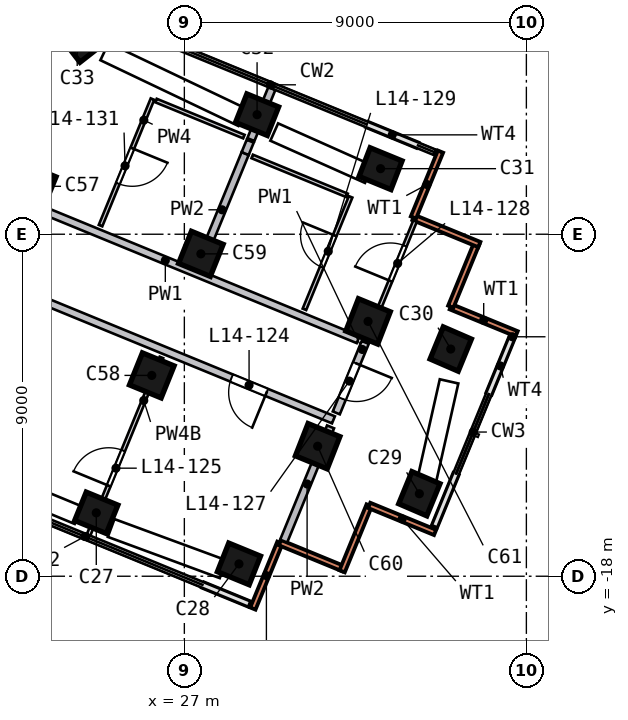
"""IFC4 building model, lengths in metres.
Left out: names, types, materials, properties, quantities, classifications, styles, units other than length and angle.
Written with IfcOpenShell. Run it as: python <this file> out.ifc"""

import sys

from ifc_helpers import new_model, si_unit, direction, frame, frame_2d, origin, origin_2d, place, context, subcontext, project, spatial, rectangle, extrude, element, fill, save


model = new_model("IFC4")
c1 = context("Model", 3, precision=1e-05, world=origin(), true_north=direction((0.0, 1.0)))
c2 = subcontext(c1, "Body", "Model", "MODEL_VIEW")
j1 = project(units=[si_unit("LENGTHUNIT", "METRE"), si_unit("PLANEANGLEUNIT", "RADIAN")], contexts=[c1])
p1 = place(None, origin())
s1 = spatial("IfcSite", under=j1, at=p1, CompositionType="ELEMENT")
p2 = place(p1, origin())
s2 = spatial("IfcBuilding", under=s1, at=p2, CompositionType="ELEMENT")
p3 = place(p2, frame((0.0, 0.0, 64.5)))
s3 = spatial("IfcBuildingStorey", under=s2, at=p3, CompositionType="ELEMENT", Elevation=64.5)
p4 = place(p3, frame((24.65, -16.498, 0.0), z_axis=(0.026751278, 0.137242391, 0.990176194), x_axis=(0.926161239, -0.376151794, 0.027114341)))
e1 = element("IfcColumn", 1, at=p4, inside=s3, PredefinedType="COLUMN", context=c2, shape_type="SweptSolid", body=[
    extrude(rectangle(XDim=0.9, YDim=0.8, at=origin_2d()), origin(), (0.0, 0.0, 1.0), 3.222),
])
p5 = place(p3, frame((28.458, -17.888, 0.0), z_axis=(-0.017180855, 0.174069185, 0.984583535), x_axis=(0.926794168, -0.366729109, 0.081008213)))
e2 = element("IfcColumn", 2, at=p5, inside=s3, PredefinedType="COLUMN", context=c2, shape_type="SweptSolid", body=[
    extrude(rectangle(XDim=0.9, YDim=0.8, at=origin_2d()), origin(), (0.0, 0.0, 1.0), 3.24),
])
p6 = place(p3, frame((33.215, -16.068, 0.0), z_axis=(-0.025810356, 0.195603485, 0.980343359), x_axis=(0.390060044, 0.904907178, -0.170282593)))
e3 = element("IfcColumn", 3, at=p6, inside=s3, PredefinedType="COLUMN", context=c2, shape_type="SweptSolid", body=[
    extrude(rectangle(XDim=0.9, YDim=0.8, at=origin_2d()), origin(), (0.0, 0.0, 1.0), 3.254),
])
p7 = place(p3, frame((34.063, -12.265, 0.0), z_axis=(-0.043682988, 0.199083534, 0.979008449), x_axis=(0.39246108, 0.90458431, -0.166437755)))
e4 = element("IfcColumn", 4, at=p7, inside=s3, PredefinedType="COLUMN", context=c2, shape_type="SweptSolid", body=[
    extrude(rectangle(XDim=0.9, YDim=0.8, at=origin_2d()), origin(), (0.0, 0.0, 1.0), 3.258),
])
p8 = place(p3, frame((32.244, -7.508, 0.0), z_axis=(-0.065892209, 0.190555172, 0.979462579), x_axis=(-0.924497872, 0.357683073, -0.13178203)))
e5 = element("IfcColumn", 5, at=p8, inside=s3, PredefinedType="COLUMN", context=c2, shape_type="SweptSolid", body=[
    extrude(rectangle(XDim=0.9, YDim=0.8, at=origin_2d()), origin(), (0.0, 0.0, 1.0), 3.257),
])
p9 = place(p3, frame((28.942, -6.044, 0.0), z_axis=(-0.022897485, 0.15665507, 0.987387915), x_axis=(-0.926259522, 0.368316181, -0.079915512)))
e6 = element("IfcColumn", 6, at=p9, inside=s3, PredefinedType="COLUMN", context=c2, shape_type="SweptSolid", body=[
    extrude(rectangle(XDim=0.9, YDim=0.8, at=origin_2d()), origin(), (0.0, 0.0, 1.0), 3.231),
])
p10 = place(p3, frame((24.16, -3.779, 0.0), z_axis=(0.017027467, 0.115011417, 0.993218223), x_axis=(0.614451168, -0.784852686, 0.080349384)))
e7 = element("IfcColumn", 7, at=p10, inside=s3, PredefinedType="COLUMN", context=c2, shape_type="SweptSolid", body=[
    extrude(rectangle(XDim=1.4, YDim=0.9, at=origin_2d()), origin(), (0.0, 0.0, 1.0), 3.212),
])
p11 = place(p3, frame((22.991, -7.871, 0.0), z_axis=(0.036566468, 0.109623383, 0.993300361), x_axis=(0.925210726, -0.379373345, 0.007808817)))
e8 = element("IfcColumn", 8, at=p11, inside=s3, PredefinedType="COLUMN", context=c2, shape_type="SweptSolid", body=[
    extrude(rectangle(XDim=0.9, YDim=0.9, at=origin_2d()), origin(), (0.0, 0.0, 1.0), 3.211),
])
p12 = place(p3, frame((26.132, -12.889, 0.0), z_axis=(0.009542442, 0.1439697, 0.989536087), x_axis=(0.926587506, -0.373331125, 0.045381329)))
e9 = element("IfcColumn", 9, at=p12, inside=s3, PredefinedType="COLUMN", context=c2, shape_type="SweptSolid", body=[
    extrude(rectangle(XDim=0.9, YDim=0.9, at=origin_2d()), origin(), (0.0, 0.0, 1.0), 3.224),
])
p13 = place(p3, frame((27.442, -9.698, 0.0), z_axis=(-0.00559941, 0.149973383, 0.988674178), x_axis=(0.926568653, -0.371058081, 0.061533996)))
e10 = element("IfcColumn", 10, at=p13, inside=s3, PredefinedType="COLUMN", context=c2, shape_type="SweptSolid", body=[
    extrude(rectangle(XDim=0.9, YDim=0.9, at=origin_2d()), origin(), (0.0, 0.0, 1.0), 3.227),
])
p14 = place(p3, frame((30.546, -14.802, 0.0), z_axis=(-0.031733166, 0.183405668, 0.982524996), x_axis=(0.926483061, -0.36341692, 0.097761344)))
e11 = element("IfcColumn", 11, at=p14, inside=s3, PredefinedType="COLUMN", context=c2, shape_type="SweptSolid", body=[
    extrude(rectangle(XDim=0.9, YDim=0.9, at=origin_2d()), origin(), (0.0, 0.0, 1.0), 3.247),
])
p15 = place(p3, frame((31.892, -11.525, 0.0), z_axis=(-0.04714013, 0.18931116, 0.980784937), x_axis=(0.925849426, -0.360274524, 0.114039935)))
e12 = element("IfcColumn", 12, at=p15, inside=s3, PredefinedType="COLUMN", context=c2, shape_type="SweptSolid", body=[
    extrude(rectangle(XDim=0.9, YDim=0.9, at=origin_2d()), origin(), (0.0, 0.0, 1.0), 3.252),
])
p16 = place(p3, frame((28.803, -18.851, 0.0), z_axis=(0.0, 0.0, 1.0), x_axis=(0.379839266, 0.925052502, 0.0)))
e13 = element("IfcWall", 13, at=p16, inside=s3, PredefinedType="SOLIDWALL", context=c2, shape_type="SweptSolid", body=[
    extrude(rectangle(XDim=1.875, YDim=0.15, at=frame_2d((0.938, 0.0))), origin(), (0.0, 0.0, 1.0), 3.19),
])
p17 = place(p3, frame((29.515, -17.117, 0.0), z_axis=(0.0, 0.0, 1.0), x_axis=(0.925070884, -0.379794498, 0.0)))
e14 = element("IfcWall", 14, at=p17, inside=s3, PredefinedType="SOLIDWALL", context=c2, shape_type="SweptSolid", body=[
    extrude(rectangle(XDim=1.8, YDim=0.15, at=frame_2d((0.9, 0.0))), origin(), (0.0, 0.0, 1.0), 3.19),
])
for number, where, z_axis, x_axis in (
    (15, (31.152, -17.87, 0.0), (0.0, 0.0, 1.0), (0.38, 0.925, 0.0)),
    (16, (31.864, -16.135, 0.0), (0.0, 0.0, 1.0), (0.925, -0.38, 0.0)),
    (17, (35.744, -11.621, 0.0), (0.0, 0.0, 1.0), (-0.925, 0.38, 0.0)),
):
    element("IfcWall", number, at=place(p3, frame(where, z_axis=z_axis, x_axis=x_axis)), inside=s3, PredefinedType="SOLIDWALL", context=c2, shape_type="SweptSolid", body=[
        extrude(rectangle(XDim=1.875, YDim=0.15, at=frame_2d((0.938, 0.0))), origin(), (0.0, 0.0, 1.0), 3.19),
    ])
p18 = place(p3, frame((34.01, -10.908, 0.0), z_axis=(0.0, 0.0, 1.0), x_axis=(0.379746847, 0.925090445, 0.0)))
e18 = element("IfcWall", 18, at=p18, inside=s3, PredefinedType="SOLIDWALL", context=c2, shape_type="SweptSolid", body=[
    extrude(rectangle(XDim=1.8, YDim=0.15, at=frame_2d((0.9, 0.0))), origin(), (0.0, 0.0, 1.0), 3.19),
])
for number, where, z_axis, x_axis in (
    (19, (34.763, -9.272, 0.0), (0.0, 0.0, 1.0), (-0.925, 0.38, 0.0)),
    (20, (33.028, -8.56, 0.0), (0.0, 0.0, 1.0), (0.38, 0.925, 0.0)),
):
    element("IfcWall", number, at=place(p3, frame(where, z_axis=z_axis, x_axis=x_axis)), inside=s3, PredefinedType="SOLIDWALL", context=c2, shape_type="SweptSolid", body=[
        extrude(rectangle(XDim=1.875, YDim=0.15, at=frame_2d((0.938, 0.0))), origin(), (0.0, 0.0, 1.0), 3.19),
    ])
p19 = place(p3, frame((27.49, -18.231, 0.0), z_axis=(0.0, 0.0, 1.0), x_axis=(0.925072618, -0.379790274, 0.0)))
e21 = element("IfcWall", 21, at=p19, inside=s3, PredefinedType="SOLIDWALL", context=c2, shape_type="SweptSolid", body=[
    extrude(rectangle(XDim=1.306, YDim=0.15, at=frame_2d((0.653, 0.0))), origin(), (0.0, 0.0, 1.0), 2.425),
])
p20 = place(p3, frame((33.588, -16.675, 0.0), z_axis=(0.0, 0.0, 1.0), x_axis=(0.379726874, 0.925098644, 0.0)))
e22 = element("IfcWall", 22, at=p20, inside=s3, PredefinedType="SOLIDWALL", context=c2, shape_type="SweptSolid", body=[
    extrude(rectangle(XDim=1.477, YDim=0.15, at=frame_2d((0.738, 0.0))), origin(), (0.0, 0.0, 1.0), 2.425),
])
p21 = place(p3, frame((35.016, -13.197, 0.0), z_axis=(0.0, 0.0, 1.0), x_axis=(0.379793722, 0.925071202, 0.0)))
e23 = element("IfcWall", 23, at=p21, inside=s3, PredefinedType="SOLIDWALL", context=c2, shape_type="SweptSolid", body=[
    extrude(rectangle(XDim=1.58, YDim=0.15, at=frame_2d((0.79, 0.0))), origin(), (0.0, 0.0, 1.0), 2.425),
])
p22 = place(p3, frame((33.134, -6.657, 0.0), z_axis=(0.0, 0.0, 1.0), x_axis=(-0.925093505, 0.379739394, 0.0)))
e24 = element("IfcWall", 24, at=p22, inside=s3, PredefinedType="SOLIDWALL", context=c2, shape_type="SweptSolid", body=[
    extrude(rectangle(XDim=1.434, YDim=0.15, at=frame_2d((0.717, 0.0))), origin(), (0.0, 0.0, 1.0), 2.425),
])
p23 = place(p3, frame((30.923, -13.884, 0.0), z_axis=(0.0, 0.0, 1.0), x_axis=(-0.92507774, 0.379777796, 0.0)))
e25 = element("IfcWall", 25, at=p23, inside=s3, PredefinedType="SOLIDWALL", context=c2, shape_type="SweptSolid", body=[
    extrude(rectangle(XDim=15.921, YDim=0.2, at=frame_2d((7.96, 0.0))), origin(), (0.0, 0.0, 1.0), 3.19),
])
p24 = place(p23, frame((1.9, 0.0, 0.0)))
e26 = element("IfcOpeningElement", 26, at=p24, cuts=e25, PredefinedType="OPENING", context=c2, shape_type="SweptSolid", body=[
    extrude(rectangle(XDim=1.0, YDim=2.1, at=frame_2d((0.5, 1.05))), frame((0.0, 0.11, 0.0), z_axis=(0.0, -1.0, 0.0), x_axis=(1.0, 0.0, 0.0)), (0.0, 0.0, 1.0), 0.22),
])
p25 = place(p3, frame((16.846, -5.727, 0.0), z_axis=(0.0, 0.0, 1.0), x_axis=(0.92507774, -0.379777796, 0.0)))
e27 = element("IfcWall", 27, at=p25, inside=s3, PredefinedType="SOLIDWALL", context=c2, shape_type="SweptSolid", body=[
    extrude(rectangle(XDim=15.921, YDim=0.2, at=frame_2d((7.96, 0.0))), origin(), (0.0, 0.0, 1.0), 3.19),
])
p26 = place(p25, frame((3.75, 0.0, 0.0)))
e28 = element("IfcOpeningElement", 28, at=p26, cuts=e27, PredefinedType="OPENING", context=c2, shape_type="SweptSolid", body=[
    extrude(rectangle(XDim=1.0, YDim=2.1, at=frame_2d((0.5, 1.05))), frame((0.0, 0.11, 0.0), z_axis=(0.0, -1.0, 0.0), x_axis=(1.0, 0.0, 0.0)), (0.0, 0.0, 1.0), 0.22),
])
p27 = place(p3, frame((31.76, -11.847, 0.0), z_axis=(0.0, 0.0, 1.0), x_axis=(-0.379818342, -0.925061094, 0.0)))
e29 = element("IfcWall", 29, at=p27, inside=s3, PredefinedType="SOLIDWALL", context=c2, shape_type="SweptSolid", body=[
    extrude(rectangle(XDim=2.004, YDim=0.2, at=frame_2d((1.002, 0.0))), origin(), (0.0, 0.0, 1.0), 3.19),
])
p28 = place(p27, frame((0.6, 0.0, 0.0)))
e30 = element("IfcOpeningElement", 30, at=p28, cuts=e29, PredefinedType="OPENING", context=c2, shape_type="SweptSolid", body=[
    extrude(rectangle(XDim=1.0, YDim=2.1, at=frame_2d((0.5, 1.05))), frame((0.0, 0.11, 0.0), z_axis=(0.0, -1.0, 0.0), x_axis=(1.0, 0.0, 0.0)), (0.0, 0.0, 1.0), 0.22),
])
p29 = place(p3, frame((27.385, -9.837, 0.0), z_axis=(0.0, 0.0, 1.0), x_axis=(0.379794115, 0.925071041, 0.0)))
e31 = element("IfcWall", 31, at=p29, inside=s3, PredefinedType="SOLIDWALL", context=c2, shape_type="SweptSolid", body=[
    extrude(rectangle(XDim=3.2, YDim=0.2, at=frame_2d((1.6, 0.0))), origin(), (0.0, 0.0, 1.0), 3.19),
])
p30 = place(p3, frame((28.6, -6.877, 0.0), z_axis=(0.0, 0.0, 1.0), x_axis=(0.379982422, 0.924993707, 0.0)))
e32 = element("IfcWall", 32, at=p30, inside=s3, PredefinedType="SOLIDWALL", context=c2, shape_type="SweptSolid", body=[
    extrude(rectangle(XDim=0.352, YDim=0.2, at=frame_2d((0.176, 0.0))), origin(), (0.0, 0.0, 1.0), 3.19),
])
p31 = place(p3, frame((28.751, -6.509, 0.0), z_axis=(0.0, 0.0, 1.0), x_axis=(0.379667061, 0.925123193, 0.0)))
e33 = element("IfcWall", 33, at=p31, inside=s3, PredefinedType="SOLIDWALL", context=c2, shape_type="SweptSolid", body=[
    extrude(rectangle(XDim=1.452, YDim=0.2, at=frame_2d((0.726, 0.0))), origin(), (0.0, 0.0, 1.0), 3.19),
])
p32 = place(p3, frame((30.847, -14.069, 0.0), z_axis=(0.0, 0.0, 1.0), x_axis=(-0.379729459, -0.925097583, 0.0)))
e34 = element("IfcWall", 34, at=p32, inside=s3, PredefinedType="SOLIDWALL", context=c2, shape_type="SweptSolid", body=[
    extrude(rectangle(XDim=3.25, YDim=0.2, at=frame_2d((1.625, 0.0))), origin(), (0.0, 0.0, 1.0), 3.19),
])
p33 = place(p3, frame((24.479, -16.914, 0.0), z_axis=(0.0, 0.0, 1.0), x_axis=(0.379777028, 0.925078056, 0.0)))
e35 = element("IfcWall", 35, at=p33, inside=s3, PredefinedType="PARTITIONING", context=c2, shape_type="SweptSolid", body=[
    extrude(rectangle(XDim=5.05, YDim=0.1, at=frame_2d((2.525, 0.0))), origin(), (0.0, 0.0, 1.0), 2.69),
])
p34 = place(p33, frame((1.4, 0.0, 0.0)))
e36 = element("IfcOpeningElement", 36, at=p34, cuts=e35, PredefinedType="OPENING", context=c2, shape_type="SweptSolid", body=[
    extrude(rectangle(XDim=1.0, YDim=2.1, at=frame_2d((0.5, 1.05))), frame((0.0, 0.06, 0.0), z_axis=(0.0, -1.0, 0.0), x_axis=(1.0, 0.0, 0.0)), (0.0, 0.0, 1.0), 0.12),
])
p35 = place(p3, frame((26.162, -5.444, 0.0), z_axis=(0.0, 0.0, 1.0), x_axis=(-0.379794498, -0.925070884, 0.0)))
e37 = element("IfcWall", 37, at=p35, inside=s3, PredefinedType="PARTITIONING", context=c2, shape_type="SweptSolid", body=[
    extrude(rectangle(XDim=3.6, YDim=0.1, at=frame_2d((1.8, 0.0))), origin(), (0.0, 0.0, 1.0), 3.19),
])
p36 = place(p35, frame((1.4, 0.0, 0.0)))
e38 = element("IfcOpeningElement", 38, at=p36, cuts=e37, PredefinedType="OPENING", context=c2, shape_type="SweptSolid", body=[
    extrude(rectangle(XDim=1.0, YDim=2.1, at=frame_2d((0.5, 1.05))), frame((0.0, 0.06, 0.0), z_axis=(0.0, -1.0, 0.0), x_axis=(1.0, 0.0, 0.0)), (0.0, 0.0, 1.0), 0.12),
])
p37 = place(p3, frame((26.254, -5.481, 0.0), z_axis=(0.0, 0.0, 1.0), x_axis=(0.925078027, -0.379777098, 0.0)))
e39 = element("IfcWall", 39, at=p37, inside=s3, PredefinedType="PARTITIONING", context=c2, shape_type="SweptSolid", body=[
    extrude(rectangle(XDim=2.5, YDim=0.1, at=frame_2d((1.25, 0.0))), origin(), (0.0, 0.0, 1.0), 3.19),
])
p38 = place(p3, frame((31.283, -7.978, 0.0), z_axis=(0.0, 0.0, 1.0), x_axis=(-0.925083925, 0.37976273, 0.0)))
e40 = element("IfcWall", 40, at=p38, inside=s3, PredefinedType="PARTITIONING", context=c2, shape_type="SweptSolid", body=[
    extrude(rectangle(XDim=2.7, YDim=0.1, at=frame_2d((1.35, 0.0))), origin(), (0.0, 0.0, 1.0), 3.19),
])
p39 = place(p3, frame((30.16, -10.977, 0.0), z_axis=(0.0, 0.0, 1.0), x_axis=(0.379702022, 0.925108845, 0.0)))
e41 = element("IfcWall", 41, at=p39, inside=s3, PredefinedType="PARTITIONING", context=c2, shape_type="SweptSolid", body=[
    extrude(rectangle(XDim=3.2, YDim=0.1, at=frame_2d((1.6, 0.0))), origin(), (0.0, 0.0, 1.0), 3.19),
])
p40 = place(p39, frame((1.2, 0.0, 0.0)))
e42 = element("IfcOpeningElement", 42, at=p40, cuts=e41, PredefinedType="OPENING", context=c2, shape_type="SweptSolid", body=[
    extrude(rectangle(XDim=0.9, YDim=2.1, at=frame_2d((0.45, 1.05))), frame((0.0, 0.06, 0.0), z_axis=(0.0, -1.0, 0.0), x_axis=(1.0, 0.0, 0.0)), (0.0, 0.0, 1.0), 0.12),
])
p41 = place(p3, frame((31.797, -11.757, 0.0), z_axis=(0.0, 0.0, 1.0), x_axis=(0.379764155, 0.92508334, 0.0)))
e43 = element("IfcWall", 43, at=p41, inside=s3, PredefinedType="PARTITIONING", context=c2, shape_type="SweptSolid", body=[
    extrude(rectangle(XDim=3.352, YDim=0.1, at=frame_2d((1.676, 0.0))), origin(), (0.0, 0.0, 1.0), 3.19),
])
p42 = place(p41, frame((1.65, 0.0, 0.0)))
e44 = element("IfcOpeningElement", 44, at=p42, cuts=e43, PredefinedType="OPENING", context=c2, shape_type="SweptSolid", body=[
    extrude(rectangle(XDim=1.0, YDim=2.1, at=frame_2d((0.5, 1.05))), frame((0.0, 0.06, 0.0), z_axis=(0.0, -1.0, 0.0), x_axis=(1.0, 0.0, 0.0)), (0.0, 0.0, 1.0), 0.12),
])
p43 = place(p24, origin())
e45 = element("IfcDoor", 45, at=p43, inside=s3, OperationType="SINGLE_SWING_LEFT", PredefinedType="DOOR", context=c2, shape_type="SweptSolid", body=[
    extrude(rectangle(XDim=1.0, YDim=2.1, at=frame_2d((0.5, 1.05))), frame((0.0, 0.025, 0.0), z_axis=(0.0, -1.0, 0.0), x_axis=(1.0, 0.0, 0.0)), (0.0, 0.0, 1.0), 0.05),
])
fill(e26, e45)
p44 = place(p34, origin())
e46 = element("IfcDoor", 46, at=p44, inside=s3, OperationType="SINGLE_SWING_LEFT", PredefinedType="DOOR", context=c2, shape_type="SweptSolid", body=[
    extrude(rectangle(XDim=1.0, YDim=2.1, at=frame_2d((0.5, 1.05))), frame((0.0, 0.025, 0.0), z_axis=(0.0, -1.0, 0.0), x_axis=(1.0, 0.0, 0.0)), (0.0, 0.0, 1.0), 0.05),
])
fill(e36, e46)
p45 = place(p28, origin())
e47 = element("IfcDoor", 47, at=p45, inside=s3, OperationType="SINGLE_SWING_LEFT", PredefinedType="DOOR", context=c2, shape_type="SweptSolid", body=[
    extrude(rectangle(XDim=1.0, YDim=2.1, at=frame_2d((0.5, 1.05))), frame((0.0, 0.025, 0.0), z_axis=(0.0, -1.0, 0.0), x_axis=(1.0, 0.0, 0.0)), (0.0, 0.0, 1.0), 0.05),
])
fill(e30, e47)
p46 = place(p42, origin())
e48 = element("IfcDoor", 48, at=p46, inside=s3, OperationType="SINGLE_SWING_LEFT", PredefinedType="DOOR", context=c2, shape_type="SweptSolid", body=[
    extrude(rectangle(XDim=1.0, YDim=2.1, at=frame_2d((0.5, 1.05))), frame((0.0, 0.025, 0.0), z_axis=(0.0, -1.0, 0.0), x_axis=(1.0, 0.0, 0.0)), (0.0, 0.0, 1.0), 0.05),
])
fill(e44, e48)
p47 = place(p40, origin())
e49 = element("IfcDoor", 49, at=p47, inside=s3, OperationType="SINGLE_SWING_RIGHT", PredefinedType="DOOR", context=c2, shape_type="SweptSolid", body=[
    extrude(rectangle(XDim=0.9, YDim=2.1, at=frame_2d((0.45, 1.05))), frame((0.0, 0.025, 0.0), z_axis=(0.0, -1.0, 0.0), x_axis=(1.0, 0.0, 0.0)), (0.0, 0.0, 1.0), 0.05),
])
fill(e42, e49)
p48 = place(p36, origin())
e50 = element("IfcDoor", 50, at=p48, inside=s3, OperationType="SINGLE_SWING_LEFT", PredefinedType="DOOR", context=c2, shape_type="SweptSolid", body=[
    extrude(rectangle(XDim=1.0, YDim=2.1, at=frame_2d((0.5, 1.05))), frame((0.0, 0.025, 0.0), z_axis=(0.0, -1.0, 0.0), x_axis=(1.0, 0.0, 0.0)), (0.0, 0.0, 1.0), 0.05),
])
fill(e38, e50)
save(model, sys.argv[1])
